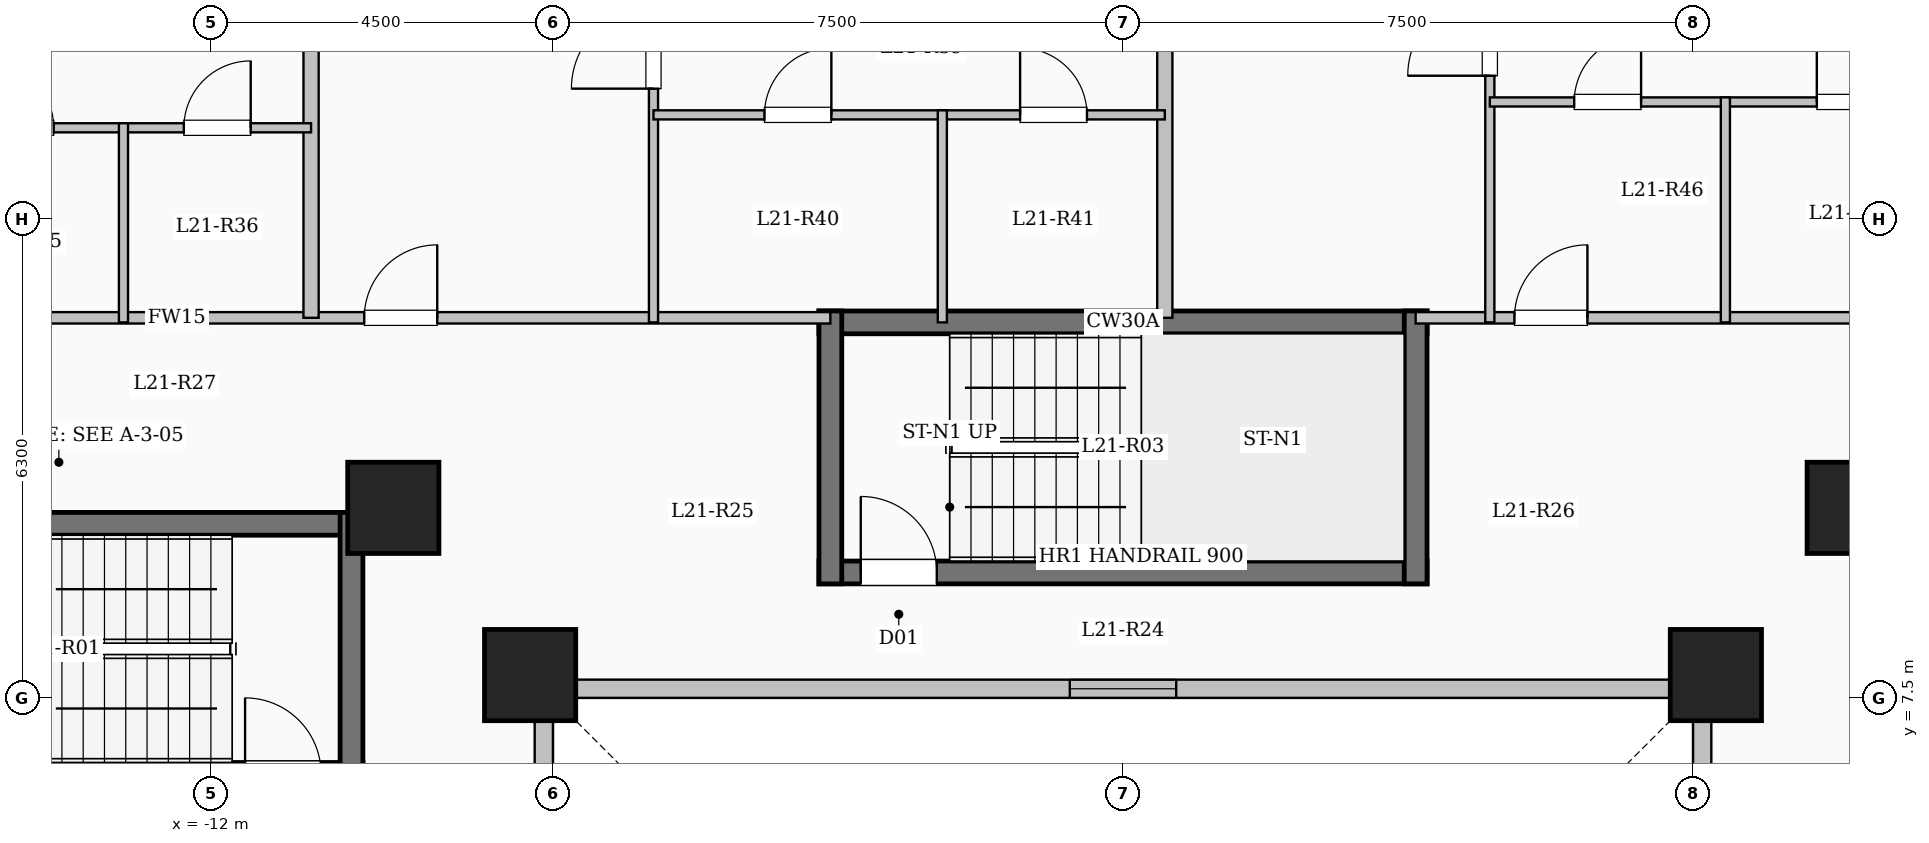
"""IFC4 building model, lengths in metres.
Left out: names, types, materials, properties, quantities, classifications, styles, units other than length and angle.
Written with IfcOpenShell. Run it as: python <this file> out.ifc"""

import sys

from ifc_helpers import new_model, si_unit, direction, frame, frame_2d, origin, origin_2d, place, context, subcontext, project, spatial, rectangle, extrude, element, fill, save


model = new_model("IFC4")
c1 = context("Model", 3, precision=1e-05, world=origin(), true_north=direction((0.0, 1.0)))
c2 = subcontext(c1, "Body", "Model", "MODEL_VIEW")
j1 = project(units=[si_unit("LENGTHUNIT", "METRE"), si_unit("PLANEANGLEUNIT", "RADIAN")], contexts=[c1])
p1 = place(None, origin())
s1 = spatial("IfcSite", under=j1, at=p1, CompositionType="ELEMENT")
p2 = place(p1, origin())
s2 = spatial("IfcBuilding", under=s1, at=p2, CompositionType="ELEMENT")
p3 = place(p2, frame((0.0, 0.0, 81.65)))
s3 = spatial("IfcBuildingStorey", under=s2, at=p3, CompositionType="ELEMENT", Elevation=81.65)
for number, where, z_axis, x_axis in (
    (1, (-7.8, 7.8, 0.0), (0.0, 0.0, 1.0), (1.0, 0.0, 0.0)),
    (2, (7.8, 7.8, 0.0), (0.0, 0.0, 1.0), (1.0, 0.0, 0.0)),
    (3, (-9.6, 10.0, 0.0), (0.0, 0.0, 1.0), (1.0, 0.0, 0.0)),
    (4, (9.6, 10.0, 0.0), (0.0, 0.0, 1.0), (1.0, 0.0, 0.0)),
):
    element("IfcColumn", number, at=place(p3, frame(where, z_axis=z_axis, x_axis=x_axis)), inside=s3, PredefinedType="COLUMN", context=c2, shape_type="SweptSolid", body=[
        extrude(rectangle(XDim=1.2, YDim=1.2, at=origin_2d()), origin(), (0.0, 0.0, 1.0), 3.35),
    ])
p4 = place(p3, frame((7.62, -7.62, 0.0), z_axis=(0.0, 0.0, 1.0), x_axis=(0.0, 1.0, 0.0)))
e5 = element("IfcWall", 5, at=p4, inside=s3, PredefinedType="SOLIDWALL", context=c2, shape_type="SweptSolid", body=[
    extrude(rectangle(XDim=15.24, YDim=0.24, at=frame_2d((7.62, 0.0))), origin(), (0.0, 0.0, 1.0), 3.1),
])
p5 = place(p4, frame((6.92, 0.0, 0.95)))
e6 = element("IfcOpeningElement", 6, at=p5, cuts=e5, PredefinedType="OPENING", context=c2, shape_type="SweptSolid", body=[
    extrude(rectangle(XDim=1.4, YDim=1.5, at=frame_2d((0.7, 0.75))), frame((0.0, 0.13, 0.0), z_axis=(0.0, -1.0, 0.0), x_axis=(1.0, 0.0, 0.0)), (0.0, 0.0, 1.0), 0.26),
])
p6 = place(p3, frame((7.62, 7.62, 0.0), z_axis=(0.0, 0.0, 1.0), x_axis=(-1.0, 0.0, 0.0)))
e7 = element("IfcWall", 7, at=p6, inside=s3, PredefinedType="SOLIDWALL", context=c2, shape_type="SweptSolid", body=[
    extrude(rectangle(XDim=15.24, YDim=0.24, at=frame_2d((7.62, 0.0))), origin(), (0.0, 0.0, 1.0), 3.1),
])
p7 = place(p6, frame((6.92, 0.0, 0.95)))
e8 = element("IfcOpeningElement", 8, at=p7, cuts=e7, PredefinedType="OPENING", context=c2, shape_type="SweptSolid", body=[
    extrude(rectangle(XDim=1.4, YDim=1.5, at=frame_2d((0.7, 0.75))), frame((0.0, 0.13, 0.0), z_axis=(0.0, -1.0, 0.0), x_axis=(1.0, 0.0, 0.0)), (0.0, 0.0, 1.0), 0.26),
])
p8 = place(p3, frame((-7.62, 7.62, 0.0), z_axis=(0.0, 0.0, 1.0), x_axis=(0.0, -1.0, 0.0)))
e9 = element("IfcWall", 9, at=p8, inside=s3, PredefinedType="SOLIDWALL", context=c2, shape_type="SweptSolid", body=[
    extrude(rectangle(XDim=15.24, YDim=0.24, at=frame_2d((7.62, 0.0))), origin(), (0.0, 0.0, 1.0), 3.1),
])
p9 = place(p8, frame((6.92, 0.0, 0.95)))
e10 = element("IfcOpeningElement", 10, at=p9, cuts=e9, PredefinedType="OPENING", context=c2, shape_type="SweptSolid", body=[
    extrude(rectangle(XDim=1.4, YDim=1.5, at=frame_2d((0.7, 0.75))), frame((0.0, 0.13, 0.0), z_axis=(0.0, -1.0, 0.0), x_axis=(1.0, 0.0, 0.0)), (0.0, 0.0, 1.0), 0.26),
])
p10 = place(p3, frame((-18.0, 9.79, 0.0), z_axis=(0.0, 0.0, 1.0), x_axis=(1.0, 0.0, 0.0)))
e11 = element("IfcWall", 11, at=p10, inside=s3, PredefinedType="SHEAR", context=c2, shape_type="SweptSolid", body=[
    extrude(rectangle(XDim=8.0, YDim=0.3, at=frame_2d((4.0, 0.0))), origin(), (0.0, 0.0, 1.0), 3.35),
])
p11 = place(p3, frame((-18.0, 6.5, 0.0), z_axis=(0.0, 0.0, 1.0), x_axis=(1.0, 0.0, 0.0)))
e12 = element("IfcWall", 12, at=p11, inside=s3, PredefinedType="SHEAR", context=c2, shape_type="SweptSolid", body=[
    extrude(rectangle(XDim=8.0, YDim=0.3, at=frame_2d((4.0, 0.0))), origin(), (0.0, 0.0, 1.0), 3.35),
])
p12 = place(p11, frame((6.45, 0.0, 0.0)))
e13 = element("IfcOpeningElement", 13, at=p12, cuts=e12, PredefinedType="OPENING", context=c2, shape_type="SweptSolid", body=[
    extrude(rectangle(XDim=1.0, YDim=2.15, at=frame_2d((0.5, 1.075))), frame((0.0, 0.16, 0.0), z_axis=(0.0, -1.0, 0.0), x_axis=(1.0, 0.0, 0.0)), (0.0, 0.0, 1.0), 0.32),
])
p13 = place(p3, frame((-10.15, 6.35, 0.0), z_axis=(0.0, 0.0, 1.0), x_axis=(0.0, 1.0, 0.0)))
e14 = element("IfcWall", 14, at=p13, inside=s3, PredefinedType="SHEAR", context=c2, shape_type="SweptSolid", body=[
    extrude(rectangle(XDim=3.59, YDim=0.3, at=frame_2d((1.795, 0.0))), origin(), (0.0, 0.0, 1.0), 3.35),
])
p14 = place(p3, frame((-4.0, 12.44, 0.0), z_axis=(0.0, 0.0, 1.0), x_axis=(1.0, 0.0, 0.0)))
e15 = element("IfcWall", 15, at=p14, inside=s3, PredefinedType="SHEAR", context=c2, shape_type="SweptSolid", body=[
    extrude(rectangle(XDim=8.0, YDim=0.3, at=frame_2d((4.0, 0.0))), origin(), (0.0, 0.0, 1.0), 3.35),
])
p15 = place(p3, frame((-4.0, 9.15, 0.0), z_axis=(0.0, 0.0, 1.0), x_axis=(1.0, 0.0, 0.0)))
e16 = element("IfcWall", 16, at=p15, inside=s3, PredefinedType="SHEAR", context=c2, shape_type="SweptSolid", body=[
    extrude(rectangle(XDim=8.0, YDim=0.3, at=frame_2d((4.0, 0.0))), origin(), (0.0, 0.0, 1.0), 3.35),
])
p16 = place(p15, frame((0.55, 0.0, 0.0)))
e17 = element("IfcOpeningElement", 17, at=p16, cuts=e16, PredefinedType="OPENING", context=c2, shape_type="SweptSolid", body=[
    extrude(rectangle(XDim=1.0, YDim=2.15, at=frame_2d((0.5, 1.075))), frame((0.0, 0.16, 0.0), z_axis=(0.0, -1.0, 0.0), x_axis=(1.0, 0.0, 0.0)), (0.0, 0.0, 1.0), 0.32),
])
for number, where, z_axis, x_axis in (
    (18, (-3.85, 9.0, 0.0), (0.0, 0.0, 1.0), (0.0, 1.0, 0.0)),
    (19, (3.85, 9.0, 0.0), (0.0, 0.0, 1.0), (0.0, 1.0, 0.0)),
):
    element("IfcWall", number, at=place(p3, frame(where, z_axis=z_axis, x_axis=x_axis)), inside=s3, PredefinedType="SHEAR", context=c2, shape_type="SweptSolid", body=[
        extrude(rectangle(XDim=3.59, YDim=0.3, at=frame_2d((1.795, 0.0))), origin(), (0.0, 0.0, 1.0), 3.35),
    ])
p17 = place(p3, frame((-21.05, 12.5, 0.0), z_axis=(0.0, 0.0, 1.0), x_axis=(1.0, 0.0, 0.0)))
e20 = element("IfcWall", 20, at=p17, inside=s3, PredefinedType="PARTITIONING", context=c2, shape_type="SweptSolid", body=[
    extrude(rectangle(XDim=17.2, YDim=0.15, at=frame_2d((8.6, 0.0))), origin(), (0.0, 0.0, 1.0), 3.1),
])
p18 = place(p17, frame((0.7, 0.0, 0.0)))
e21 = element("IfcOpeningElement", 21, at=p18, cuts=e20, PredefinedType="OPENING", context=c2, shape_type="SweptSolid", body=[
    extrude(rectangle(XDim=0.96, YDim=2.15, at=frame_2d((0.48, 1.075))), frame((0.0, 0.085, 0.0), z_axis=(0.0, -1.0, 0.0), x_axis=(1.0, 0.0, 0.0)), (0.0, 0.0, 1.0), 0.17),
])
p19 = place(p17, frame((11.068, 0.0, 0.0)))
e22 = element("IfcOpeningElement", 22, at=p19, cuts=e20, PredefinedType="OPENING", context=c2, shape_type="SweptSolid", body=[
    extrude(rectangle(XDim=0.96, YDim=2.15, at=frame_2d((0.48, 1.075))), frame((0.0, 0.085, 0.0), z_axis=(0.0, -1.0, 0.0), x_axis=(1.0, 0.0, 0.0)), (0.0, 0.0, 1.0), 0.17),
])
p20 = place(p3, frame((3.85, 12.5, 0.0), z_axis=(0.0, 0.0, 1.0), x_axis=(1.0, 0.0, 0.0)))
e23 = element("IfcWall", 23, at=p20, inside=s3, PredefinedType="PARTITIONING", context=c2, shape_type="SweptSolid", body=[
    extrude(rectangle(XDim=17.2, YDim=0.15, at=frame_2d((8.6, 0.0))), origin(), (0.0, 0.0, 1.0), 3.1),
])
p21 = place(p20, frame((1.3, 0.0, 0.0)))
e24 = element("IfcOpeningElement", 24, at=p21, cuts=e23, PredefinedType="OPENING", context=c2, shape_type="SweptSolid", body=[
    extrude(rectangle(XDim=0.96, YDim=2.15, at=frame_2d((0.48, 1.075))), frame((0.0, 0.085, 0.0), z_axis=(0.0, -1.0, 0.0), x_axis=(1.0, 0.0, 0.0)), (0.0, 0.0, 1.0), 0.17),
])
p22 = place(p20, frame((8.06, 0.0, 0.0)))
e25 = element("IfcOpeningElement", 25, at=p22, cuts=e23, PredefinedType="OPENING", context=c2, shape_type="SweptSolid", body=[
    extrude(rectangle(XDim=0.96, YDim=2.15, at=frame_2d((0.48, 1.075))), frame((0.0, 0.085, 0.0), z_axis=(0.0, -1.0, 0.0), x_axis=(1.0, 0.0, 0.0)), (0.0, 0.0, 1.0), 0.17),
])
p23 = place(p3, frame((0.55, 12.5, 0.0), z_axis=(0.0, 0.0, 1.0), x_axis=(0.0, 1.0, 0.0)))
e26 = element("IfcWall", 26, at=p23, inside=s3, PredefinedType="SOLIDWALL", context=c2, shape_type="SweptSolid", body=[
    extrude(rectangle(XDim=11.08, YDim=0.2, at=frame_2d((5.54, 0.0))), origin(), (0.0, 0.0, 1.0), 3.1),
])
p24 = place(p3, frame((-10.682, 12.5, 0.0), z_axis=(0.0, 0.0, 1.0), x_axis=(0.0, 1.0, 0.0)))
e27 = element("IfcWall", 27, at=p24, inside=s3, PredefinedType="SOLIDWALL", context=c2, shape_type="SweptSolid", body=[
    extrude(rectangle(XDim=9.678, YDim=0.2, at=frame_2d((4.839, 0.0))), origin(), (0.0, 0.0, 1.0), 3.1),
])
p25 = place(p3, frame((-15.866, 15.0, 0.0), z_axis=(0.0, 0.0, 1.0), x_axis=(1.0, 0.0, 0.0)))
e28 = element("IfcWall", 28, at=p25, inside=s3, PredefinedType="PARTITIONING", context=c2, shape_type="SweptSolid", body=[
    extrude(rectangle(XDim=2.716, YDim=0.12, at=frame_2d((1.358, 0.0))), origin(), (0.0, 0.0, 1.0), 3.1),
])
p26 = place(p25, frame((0.918, 0.0, 0.0)))
e29 = element("IfcOpeningElement", 29, at=p26, cuts=e28, PredefinedType="OPENING", context=c2, shape_type="SweptSolid", body=[
    extrude(rectangle(XDim=0.88, YDim=2.1, at=frame_2d((0.44, 1.05))), frame((0.0, 0.07, 0.0), z_axis=(0.0, -1.0, 0.0), x_axis=(1.0, 0.0, 0.0)), (0.0, 0.0, 1.0), 0.14),
])
p27 = place(p3, frame((-13.15, 15.0, 0.0), z_axis=(0.0, 0.0, 1.0), x_axis=(1.0, 0.0, 0.0)))
e30 = element("IfcWall", 30, at=p27, inside=s3, PredefinedType="PARTITIONING", context=c2, shape_type="SweptSolid", body=[
    extrude(rectangle(XDim=2.468, YDim=0.12, at=frame_2d((1.234, 0.0))), origin(), (0.0, 0.0, 1.0), 3.1),
])
p28 = place(p27, frame((0.794, 0.0, 0.0)))
e31 = element("IfcOpeningElement", 31, at=p28, cuts=e30, PredefinedType="OPENING", context=c2, shape_type="SweptSolid", body=[
    extrude(rectangle(XDim=0.88, YDim=2.1, at=frame_2d((0.44, 1.05))), frame((0.0, 0.07, 0.0), z_axis=(0.0, -1.0, 0.0), x_axis=(1.0, 0.0, 0.0)), (0.0, 0.0, 1.0), 0.14),
])
p29 = place(p3, frame((-13.15, 12.44, 0.0), z_axis=(0.0, 0.0, 1.0), x_axis=(0.0, 1.0, 0.0)))
e32 = element("IfcWall", 32, at=p29, inside=s3, PredefinedType="PARTITIONING", context=c2, shape_type="SweptSolid", body=[
    extrude(rectangle(XDim=2.62, YDim=0.12, at=frame_2d((1.31, 0.0))), origin(), (0.0, 0.0, 1.0), 3.1),
])
p30 = place(p3, frame((-6.177, 12.44, 0.0), z_axis=(0.0, 0.0, 1.0), x_axis=(0.0, 1.0, 0.0)))
e33 = element("IfcWall", 33, at=p30, inside=s3, PredefinedType="PARTITIONING", context=c2, shape_type="SweptSolid", body=[
    extrude(rectangle(XDim=10.85, YDim=0.12, at=frame_2d((5.425, 0.0))), origin(), (0.0, 0.0, 1.0), 3.1),
])
p31 = place(p30, frame((3.075, 0.0, 0.0)))
e34 = element("IfcOpeningElement", 34, at=p31, cuts=e33, PredefinedType="OPENING", context=c2, shape_type="SweptSolid", body=[
    extrude(rectangle(XDim=1.08, YDim=2.15, at=frame_2d((0.54, 1.075))), frame((0.0, 0.07, 0.0), z_axis=(0.0, -1.0, 0.0), x_axis=(1.0, 0.0, 0.0)), (0.0, 0.0, 1.0), 0.14),
])
p32 = place(p3, frame((-6.177, 15.17, 0.0), z_axis=(0.0, 0.0, 1.0), x_axis=(1.0, 0.0, 0.0)))
e35 = element("IfcWall", 35, at=p32, inside=s3, PredefinedType="PARTITIONING", context=c2, shape_type="SweptSolid", body=[
    extrude(rectangle(XDim=3.8, YDim=0.12, at=frame_2d((1.9, 0.0))), origin(), (0.0, 0.0, 1.0), 3.1),
])
p33 = place(p32, frame((1.46, 0.0, 0.0)))
e36 = element("IfcOpeningElement", 36, at=p33, cuts=e35, PredefinedType="OPENING", context=c2, shape_type="SweptSolid", body=[
    extrude(rectangle(XDim=0.88, YDim=2.1, at=frame_2d((0.44, 1.05))), frame((0.0, 0.07, 0.0), z_axis=(0.0, -1.0, 0.0), x_axis=(1.0, 0.0, 0.0)), (0.0, 0.0, 1.0), 0.14),
])
p34 = place(p3, frame((-2.377, 15.17, 0.0), z_axis=(0.0, 0.0, 1.0), x_axis=(1.0, 0.0, 0.0)))
e37 = element("IfcWall", 37, at=p34, inside=s3, PredefinedType="PARTITIONING", context=c2, shape_type="SweptSolid", body=[
    extrude(rectangle(XDim=2.927, YDim=0.12, at=frame_2d((1.463, 0.0))), origin(), (0.0, 0.0, 1.0), 3.1),
])
p35 = place(p34, frame((1.023, 0.0, 0.0)))
e38 = element("IfcOpeningElement", 38, at=p35, cuts=e37, PredefinedType="OPENING", context=c2, shape_type="SweptSolid", body=[
    extrude(rectangle(XDim=0.88, YDim=2.1, at=frame_2d((0.44, 1.05))), frame((0.0, 0.07, 0.0), z_axis=(0.0, -1.0, 0.0), x_axis=(1.0, 0.0, 0.0)), (0.0, 0.0, 1.0), 0.14),
])
p36 = place(p3, frame((-2.377, 12.44, 0.0), z_axis=(0.0, 0.0, 1.0), x_axis=(0.0, 1.0, 0.0)))
e39 = element("IfcWall", 39, at=p36, inside=s3, PredefinedType="PARTITIONING", context=c2, shape_type="SweptSolid", body=[
    extrude(rectangle(XDim=2.79, YDim=0.12, at=frame_2d((1.395, 0.0))), origin(), (0.0, 0.0, 1.0), 3.1),
])
p37 = place(p3, frame((4.826, 12.44, 0.0), z_axis=(0.0, 0.0, 1.0), x_axis=(0.0, 1.0, 0.0)))
e40 = element("IfcWall", 40, at=p37, inside=s3, PredefinedType="PARTITIONING", context=c2, shape_type="SweptSolid", body=[
    extrude(rectangle(XDim=11.14, YDim=0.12, at=frame_2d((5.57, 0.0))), origin(), (0.0, 0.0, 1.0), 3.1),
])
p38 = place(p37, frame((3.245, 0.0, 0.0)))
e41 = element("IfcOpeningElement", 41, at=p38, cuts=e40, PredefinedType="OPENING", context=c2, shape_type="SweptSolid", body=[
    extrude(rectangle(XDim=1.08, YDim=2.15, at=frame_2d((0.54, 1.075))), frame((0.0, 0.07, 0.0), z_axis=(0.0, -1.0, 0.0), x_axis=(1.0, 0.0, 0.0)), (0.0, 0.0, 1.0), 0.14),
])
p39 = place(p3, frame((4.826, 15.34, 0.0), z_axis=(0.0, 0.0, 1.0), x_axis=(1.0, 0.0, 0.0)))
e42 = element("IfcWall", 42, at=p39, inside=s3, PredefinedType="PARTITIONING", context=c2, shape_type="SweptSolid", body=[
    extrude(rectangle(XDim=3.099, YDim=0.12, at=frame_2d((1.55, 0.0))), origin(), (0.0, 0.0, 1.0), 3.1),
])
p40 = place(p39, frame((1.11, 0.0, 0.0)))
e43 = element("IfcOpeningElement", 43, at=p40, cuts=e42, PredefinedType="OPENING", context=c2, shape_type="SweptSolid", body=[
    extrude(rectangle(XDim=0.88, YDim=2.1, at=frame_2d((0.44, 1.05))), frame((0.0, 0.07, 0.0), z_axis=(0.0, -1.0, 0.0), x_axis=(1.0, 0.0, 0.0)), (0.0, 0.0, 1.0), 0.14),
])
p41 = place(p3, frame((7.925, 15.34, 0.0), z_axis=(0.0, 0.0, 1.0), x_axis=(1.0, 0.0, 0.0)))
e44 = element("IfcWall", 44, at=p41, inside=s3, PredefinedType="PARTITIONING", context=c2, shape_type="SweptSolid", body=[
    extrude(rectangle(XDim=3.285, YDim=0.12, at=frame_2d((1.643, 0.0))), origin(), (0.0, 0.0, 1.0), 3.1),
])
p42 = place(p41, frame((1.203, 0.0, 0.0)))
e45 = element("IfcOpeningElement", 45, at=p42, cuts=e44, PredefinedType="OPENING", context=c2, shape_type="SweptSolid", body=[
    extrude(rectangle(XDim=0.88, YDim=2.1, at=frame_2d((0.44, 1.05))), frame((0.0, 0.07, 0.0), z_axis=(0.0, -1.0, 0.0), x_axis=(1.0, 0.0, 0.0)), (0.0, 0.0, 1.0), 0.14),
])
p43 = place(p3, frame((7.925, 12.44, 0.0), z_axis=(0.0, 0.0, 1.0), x_axis=(0.0, 1.0, 0.0)))
e46 = element("IfcWall", 46, at=p43, inside=s3, PredefinedType="PARTITIONING", context=c2, shape_type="SweptSolid", body=[
    extrude(rectangle(XDim=2.96, YDim=0.12, at=frame_2d((1.48, 0.0))), origin(), (0.0, 0.0, 1.0), 2.435),
])
p44 = place(p7, origin())
e47 = element("IfcWindow", 47, at=p44, inside=s3, PartitioningType="SINGLE_PANEL", PredefinedType="WINDOW", context=c2, shape_type="SweptSolid", body=[
    extrude(rectangle(XDim=1.4, YDim=1.5, at=frame_2d((0.7, 0.75))), frame((0.0, 0.03, 0.0), z_axis=(0.0, -1.0, 0.0), x_axis=(1.0, 0.0, 0.0)), (0.0, 0.0, 1.0), 0.06),
])
fill(e8, e47)
p45 = place(p16, origin())
e48 = element("IfcDoor", 48, at=p45, inside=s3, OperationType="SINGLE_SWING_LEFT", PredefinedType="DOOR", context=c2, shape_type="SweptSolid", body=[
    extrude(rectangle(XDim=1.0, YDim=2.15, at=frame_2d((0.5, 1.075))), frame((0.0, 0.025, 0.0), z_axis=(0.0, -1.0, 0.0), x_axis=(1.0, 0.0, 0.0)), (0.0, 0.0, 1.0), 0.05),
])
fill(e17, e48)
p46 = place(p26, origin())
e49 = element("IfcDoor", 49, at=p46, inside=s3, OperationType="SINGLE_SWING_LEFT", PredefinedType="DOOR", context=c2, shape_type="SweptSolid", body=[
    extrude(rectangle(XDim=0.88, YDim=2.1, at=frame_2d((0.44, 1.05))), frame((0.0, 0.025, 0.0), z_axis=(0.0, -1.0, 0.0), x_axis=(1.0, 0.0, 0.0)), (0.0, 0.0, 1.0), 0.05),
])
fill(e29, e49)
p47 = place(p28, origin())
e50 = element("IfcDoor", 50, at=p47, inside=s3, OperationType="SINGLE_SWING_RIGHT", PredefinedType="DOOR", context=c2, shape_type="SweptSolid", body=[
    extrude(rectangle(XDim=0.88, YDim=2.1, at=frame_2d((0.44, 1.05))), frame((0.0, 0.025, 0.0), z_axis=(0.0, -1.0, 0.0), x_axis=(1.0, 0.0, 0.0)), (0.0, 0.0, 1.0), 0.05),
])
fill(e31, e50)
p48 = place(p19, origin())
e51 = element("IfcDoor", 51, at=p48, inside=s3, OperationType="SINGLE_SWING_RIGHT", PredefinedType="DOOR", context=c2, shape_type="SweptSolid", body=[
    extrude(rectangle(XDim=0.96, YDim=2.15, at=frame_2d((0.48, 1.075))), frame((0.0, 0.025, 0.0), z_axis=(0.0, -1.0, 0.0), x_axis=(1.0, 0.0, 0.0)), (0.0, 0.0, 1.0), 0.05),
])
fill(e22, e51)
p49 = place(p31, origin())
e52 = element("IfcDoor", 52, at=p49, inside=s3, OperationType="SINGLE_SWING_LEFT", PredefinedType="DOOR", context=c2, shape_type="SweptSolid", body=[
    extrude(rectangle(XDim=1.08, YDim=2.15, at=frame_2d((0.54, 1.075))), frame((0.0, 0.025, 0.0), z_axis=(0.0, -1.0, 0.0), x_axis=(1.0, 0.0, 0.0)), (0.0, 0.0, 1.0), 0.05),
])
fill(e34, e52)
p50 = place(p33, origin())
e53 = element("IfcDoor", 53, at=p50, inside=s3, OperationType="SINGLE_SWING_RIGHT", PredefinedType="DOOR", context=c2, shape_type="SweptSolid", body=[
    extrude(rectangle(XDim=0.88, YDim=2.1, at=frame_2d((0.44, 1.05))), frame((0.0, 0.025, 0.0), z_axis=(0.0, -1.0, 0.0), x_axis=(1.0, 0.0, 0.0)), (0.0, 0.0, 1.0), 0.05),
])
fill(e36, e53)
p51 = place(p35, origin())
e54 = element("IfcDoor", 54, at=p51, inside=s3, OperationType="SINGLE_SWING_LEFT", PredefinedType="DOOR", context=c2, shape_type="SweptSolid", body=[
    extrude(rectangle(XDim=0.88, YDim=2.1, at=frame_2d((0.44, 1.05))), frame((0.0, 0.025, 0.0), z_axis=(0.0, -1.0, 0.0), x_axis=(1.0, 0.0, 0.0)), (0.0, 0.0, 1.0), 0.05),
])
fill(e38, e54)
p52 = place(p21, origin())
e55 = element("IfcDoor", 55, at=p52, inside=s3, OperationType="SINGLE_SWING_RIGHT", PredefinedType="DOOR", context=c2, shape_type="SweptSolid", body=[
    extrude(rectangle(XDim=0.96, YDim=2.15, at=frame_2d((0.48, 1.075))), frame((0.0, 0.025, 0.0), z_axis=(0.0, -1.0, 0.0), x_axis=(1.0, 0.0, 0.0)), (0.0, 0.0, 1.0), 0.05),
])
fill(e24, e55)
p53 = place(p38, origin())
e56 = element("IfcDoor", 56, at=p53, inside=s3, OperationType="SINGLE_SWING_LEFT", PredefinedType="DOOR", context=c2, shape_type="SweptSolid", body=[
    extrude(rectangle(XDim=1.08, YDim=2.15, at=frame_2d((0.54, 1.075))), frame((0.0, 0.025, 0.0), z_axis=(0.0, -1.0, 0.0), x_axis=(1.0, 0.0, 0.0)), (0.0, 0.0, 1.0), 0.05),
])
fill(e41, e56)
p54 = place(p40, origin())
e57 = element("IfcDoor", 57, at=p54, inside=s3, OperationType="SINGLE_SWING_RIGHT", PredefinedType="DOOR", context=c2, shape_type="SweptSolid", body=[
    extrude(rectangle(XDim=0.88, YDim=2.1, at=frame_2d((0.44, 1.05))), frame((0.0, 0.025, 0.0), z_axis=(0.0, -1.0, 0.0), x_axis=(1.0, 0.0, 0.0)), (0.0, 0.0, 1.0), 0.05),
])
fill(e43, e57)
p55 = place(p42, origin())
e58 = element("IfcDoor", 58, at=p55, inside=s3, OperationType="SINGLE_SWING_LEFT", PredefinedType="DOOR", context=c2, shape_type="SweptSolid", body=[
    extrude(rectangle(XDim=0.88, YDim=2.1, at=frame_2d((0.44, 1.05))), frame((0.0, 0.025, 0.0), z_axis=(0.0, -1.0, 0.0), x_axis=(1.0, 0.0, 0.0)), (0.0, 0.0, 1.0), 0.05),
])
fill(e45, e58)
save(model, sys.argv[1])
